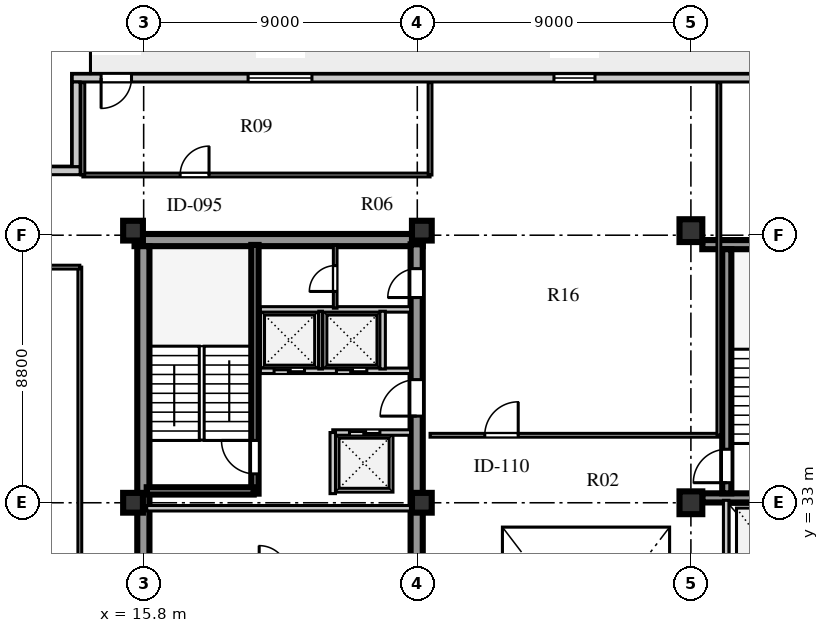
"""IFC4 building model, lengths in metres.
Left out: names, types, materials, properties, quantities, classifications, styles, units other than length and angle.
Written with IfcOpenShell. Run it as: python <this file> out.ifc"""

import sys

from ifc_helpers import new_model, si_unit, direction, frame, frame_2d, origin, origin_2d, place, context, subcontext, project, spatial, rectangle, extrude, element, fill, save


model = new_model("IFC4")
c1 = context("Model", 3, precision=1e-05, world=origin(), true_north=direction((0.0, 1.0)))
c2 = subcontext(c1, "Body", "Model", "MODEL_VIEW")
j1 = project(units=[si_unit("LENGTHUNIT", "METRE"), si_unit("PLANEANGLEUNIT", "RADIAN")], contexts=[c1])
p1 = place(None, origin())
s1 = spatial("IfcSite", under=j1, at=p1, CompositionType="ELEMENT")
p2 = place(p1, origin())
s2 = spatial("IfcBuilding", under=s1, at=p2, CompositionType="ELEMENT")
p3 = place(p2, frame((0.0, 0.0, 272.6)))
s3 = spatial("IfcBuildingStorey", under=s2, at=p3, CompositionType="ELEMENT", Elevation=272.6)
p4 = place(p3, frame((15.5, 41.64, 0.0), z_axis=(0.0, 0.0, 1.0), x_axis=(1.0, 0.0, 0.0)))
e1 = element("IfcWall", 1, at=p4, inside=s3, PredefinedType="SHEAR", context=c2, shape_type="SweptSolid", body=[
    extrude(rectangle(XDim=9.48, YDim=0.4, at=frame_2d((4.74, 0.0))), origin(), (0.0, 0.0, 1.0), 3.66),
])
p5 = place(p3, frame((15.79, 15.81, 0.0), z_axis=(0.0, 0.0, 1.0), x_axis=(0.0, 1.0, 0.0)))
e2 = element("IfcWall", 2, at=p5, inside=s3, PredefinedType="SHEAR", context=c2, shape_type="SweptSolid", body=[
    extrude(rectangle(XDim=25.63, YDim=0.4, at=frame_2d((12.815, 0.0))), origin(), (0.0, 0.0, 1.0), 3.66),
])
p6 = place(p3, frame((24.78, 15.74, 0.0), z_axis=(0.0, 0.0, 1.0), x_axis=(0.0, 1.0, 0.0)))
e3 = element("IfcWall", 3, at=p6, inside=s3, PredefinedType="SHEAR", context=c2, shape_type="SweptSolid", body=[
    extrude(rectangle(XDim=25.76, YDim=0.4, at=frame_2d((12.88, 0.0))), origin(), (0.0, 0.0, 1.0), 3.66),
])
p7 = place(p6, frame((1.61, 0.0, 0.0)))
e4 = element("IfcOpeningElement", 4, at=p7, cuts=e3, PredefinedType="OPENING", context=c2, shape_type="SweptSolid", body=[
    extrude(rectangle(XDim=1.2, YDim=2.1, at=frame_2d((0.6, 1.05))), frame((0.0, 0.21, 0.0), z_axis=(0.0, -1.0, 0.0), x_axis=(1.0, 0.0, 0.0)), (0.0, 0.0, 1.0), 0.42),
])
p8 = place(p6, frame((6.78, 0.0, 0.0)))
e5 = element("IfcOpeningElement", 5, at=p8, cuts=e3, PredefinedType="OPENING", context=c2, shape_type="SweptSolid", body=[
    extrude(rectangle(XDim=0.85, YDim=2.06, at=frame_2d((0.425, 1.03))), frame((0.0, 0.21, 0.0), z_axis=(0.0, -1.0, 0.0), x_axis=(1.0, 0.0, 0.0)), (0.0, 0.0, 1.0), 0.42),
])
p9 = place(p6, frame((12.11, 0.0, 0.0)))
e6 = element("IfcOpeningElement", 6, at=p9, cuts=e3, PredefinedType="OPENING", context=c2, shape_type="SweptSolid", body=[
    extrude(rectangle(XDim=1.5, YDim=2.12, at=frame_2d((0.75, 1.06))), frame((0.0, 0.21, 0.0), z_axis=(0.0, -1.0, 0.0), x_axis=(1.0, 0.0, 0.0)), (0.0, 0.0, 1.0), 0.42),
])
p10 = place(p6, frame((20.11, 0.0, 0.0)))
e7 = element("IfcOpeningElement", 7, at=p10, cuts=e3, PredefinedType="OPENING", context=c2, shape_type="SweptSolid", body=[
    extrude(rectangle(XDim=1.2, YDim=2.12, at=frame_2d((0.6, 1.06))), frame((0.0, 0.21, 0.0), z_axis=(0.0, -1.0, 0.0), x_axis=(1.0, 0.0, 0.0)), (0.0, 0.0, 1.0), 0.42),
])
p11 = place(p6, frame((24.01, 0.0, 0.0)))
e8 = element("IfcOpeningElement", 8, at=p11, cuts=e3, PredefinedType="OPENING", context=c2, shape_type="SweptSolid", body=[
    extrude(rectangle(XDim=0.95, YDim=2.1, at=frame_2d((0.475, 1.05))), frame((0.0, 0.21, 0.0), z_axis=(0.0, -1.0, 0.0), x_axis=(1.0, 0.0, 0.0)), (0.0, 0.0, 1.0), 0.42),
])
for number, where, z_axis, x_axis in (
    (9, (34.175, 33.16, 0.0), (0.0, 0.0, 1.0), (1.0, 0.0, 0.0)),
    (10, (34.175, 41.49, 0.0), (0.0, 0.0, 1.0), (1.0, 0.0, 0.0)),
):
    element("IfcWall", number, at=place(p3, frame(where, z_axis=z_axis, x_axis=x_axis)), inside=s3, PredefinedType="SHEAR", context=c2, shape_type="SweptSolid", body=[
        extrude(rectangle(XDim=4.695, YDim=0.3, at=frame_2d((2.348, 0.0))), origin(), (0.0, 0.0, 1.0), 3.66),
    ])
p12 = place(p3, frame((34.98, 33.31, 0.0), z_axis=(0.0, 0.0, 1.0), x_axis=(0.0, 1.0, 0.0)))
e11 = element("IfcWall", 11, at=p12, inside=s3, PredefinedType="SHEAR", context=c2, shape_type="SweptSolid", body=[
    extrude(rectangle(XDim=8.03, YDim=0.3, at=frame_2d((4.015, 0.0))), origin(), (0.0, 0.0, 1.0), 3.66),
])
p13 = place(p12, frame((0.35, 0.0, 0.0)))
e12 = element("IfcOpeningElement", 12, at=p13, cuts=e11, PredefinedType="OPENING", context=c2, shape_type="SweptSolid", body=[
    extrude(rectangle(XDim=1.1, YDim=2.1, at=frame_2d((0.55, 1.05))), frame((0.0, 0.16, 0.0), z_axis=(0.0, -1.0, 0.0), x_axis=(1.0, 0.0, 0.0)), (0.0, 0.0, 1.0), 0.32),
])
for number, where, z_axis, x_axis in (
    (13, (15.45, 33.0, 0.0), (0.0, 0.0, 1.0), (1.0, 0.0, 0.0)),
    (14, (15.45, 41.95, 0.0), (0.0, 0.0, 1.0), (1.0, 0.0, 0.0)),
    (15, (24.95, 33.0, 0.0), (0.0, 0.0, 1.0), (1.0, 0.0, 0.0)),
    (16, (24.95, 41.95, 0.0), (0.0, 0.0, 1.0), (1.0, 0.0, 0.0)),
):
    element("IfcColumn", number, at=place(p3, frame(where, z_axis=z_axis, x_axis=x_axis)), inside=s3, PredefinedType="COLUMN", context=c2, shape_type="SweptSolid", body=[
        extrude(rectangle(XDim=0.65, YDim=0.65, at=origin_2d()), origin(), (0.0, 0.0, 1.0), 3.66),
    ])
for number, where, z_axis, x_axis in (
    (17, (33.8, 33.0, 0.0), (0.0, 0.0, 1.0), (1.0, 0.0, 0.0)),
    (18, (33.8, 41.95, 0.0), (0.0, 0.0, 1.0), (1.0, 0.0, 0.0)),
):
    element("IfcColumn", number, at=place(p3, frame(where, z_axis=z_axis, x_axis=x_axis)), inside=s3, PredefinedType="COLUMN", context=c2, shape_type="SweptSolid", body=[
        extrude(rectangle(XDim=0.75, YDim=0.75, at=origin_2d()), origin(), (0.0, 0.0, 1.0), 3.66),
    ])
p14 = place(p3, frame((45.15, 46.97, 0.0), z_axis=(0.0, 0.0, 1.0), x_axis=(-1.0, 0.0, 0.0)))
e19 = element("IfcWall", 19, at=p14, inside=s3, PredefinedType="SOLIDWALL", context=c2, shape_type="SweptSolid", body=[
    extrude(rectangle(XDim=31.7, YDim=0.26, at=frame_2d((15.85, 0.0))), origin(), (0.0, 0.0, 1.0), 3.66),
])
p15 = place(p14, frame((29.75, 0.0, 0.0)))
e20 = element("IfcOpeningElement", 20, at=p15, cuts=e19, PredefinedType="OPENING", context=c2, shape_type="SweptSolid", body=[
    extrude(rectangle(XDim=1.0, YDim=2.05, at=frame_2d((0.5, 1.025))), frame((0.0, 0.14, 0.0), z_axis=(0.0, -1.0, 0.0), x_axis=(1.0, 0.0, 0.0)), (0.0, 0.0, 1.0), 0.28),
])
p16 = place(p14, frame((23.815, 0.0, 0.8)))
e21 = element("IfcOpeningElement", 21, at=p16, cuts=e19, PredefinedType="OPENING", context=c2, shape_type="SweptSolid", body=[
    extrude(rectangle(XDim=2.1, YDim=1.95, at=frame_2d((1.05, 0.975))), frame((0.0, 0.14, 0.0), z_axis=(0.0, -1.0, 0.0), x_axis=(1.0, 0.0, 0.0)), (0.0, 0.0, 1.0), 0.28),
])
p17 = place(p14, frame((14.505, 0.0, 0.8)))
e22 = element("IfcOpeningElement", 22, at=p17, cuts=e19, PredefinedType="OPENING", context=c2, shape_type="SweptSolid", body=[
    extrude(rectangle(XDim=1.35, YDim=1.9, at=frame_2d((0.675, 0.95))), frame((0.0, 0.14, 0.0), z_axis=(0.0, -1.0, 0.0), x_axis=(1.0, 0.0, 0.0)), (0.0, 0.0, 1.0), 0.28),
])
p18 = place(p14, frame((4.445, 0.0, 0.8)))
e23 = element("IfcOpeningElement", 23, at=p18, cuts=e19, PredefinedType="OPENING", context=c2, shape_type="SweptSolid", body=[
    extrude(rectangle(XDim=1.65, YDim=1.95, at=frame_2d((0.825, 0.975))), frame((0.0, 0.14, 0.0), z_axis=(0.0, -1.0, 0.0), x_axis=(1.0, 0.0, 0.0)), (0.0, 0.0, 1.0), 0.28),
])
p19 = place(p3, frame((13.58, 46.84, 0.0), z_axis=(0.0, 0.0, 1.0), x_axis=(0.0, -1.0, 0.0)))
e24 = element("IfcWall", 24, at=p19, inside=s3, PredefinedType="SOLIDWALL", context=c2, shape_type="SweptSolid", body=[
    extrude(rectangle(XDim=2.79, YDim=0.26, at=frame_2d((1.395, 0.0))), origin(), (0.0, 0.0, 1.0), 3.66),
])
p20 = place(p3, frame((13.71, 43.92, 0.0), z_axis=(0.0, 0.0, 1.0), x_axis=(-1.0, 0.0, 0.0)))
e25 = element("IfcWall", 25, at=p20, inside=s3, PredefinedType="SOLIDWALL", context=c2, shape_type="SweptSolid", body=[
    extrude(rectangle(XDim=3.31, YDim=0.26, at=frame_2d((1.655, 0.0))), origin(), (0.0, 0.0, 1.0), 3.66),
])
p21 = place(p3, frame((15.9, 32.82, 0.0), z_axis=(0.0, 0.0, 1.0), x_axis=(1.0, 0.0, 0.0)))
e26 = element("IfcWall", 26, at=p21, inside=s3, PredefinedType="SOLIDWALL", context=c2, shape_type="SweptSolid", body=[
    extrude(rectangle(XDim=8.68, YDim=0.18, at=frame_2d((4.34, 0.0))), origin(), (0.0, 0.0, 1.0), 3.06),
])
p22 = place(p3, frame((19.46, 33.3, 0.0), z_axis=(0.0, 0.0, 1.0), x_axis=(0.0, 1.0, 0.0)))
e27 = element("IfcWall", 27, at=p22, inside=s3, PredefinedType="SHEAR", context=c2, shape_type="SweptSolid", body=[
    extrude(rectangle(XDim=8.18, YDim=0.24, at=frame_2d((4.09, 0.0))), origin(), (0.0, 0.0, 1.0), 3.9),
])
p23 = place(p22, frame((0.65, 0.0, 0.0)))
e28 = element("IfcOpeningElement", 28, at=p23, cuts=e27, PredefinedType="OPENING", context=c2, shape_type="SweptSolid", body=[
    extrude(rectangle(XDim=1.1, YDim=2.1, at=frame_2d((0.55, 1.05))), frame((0.0, 0.13, 0.0), z_axis=(0.0, -1.0, 0.0), x_axis=(1.0, 0.0, 0.0)), (0.0, 0.0, 1.0), 0.26),
])
p24 = place(p3, frame((15.9, 33.39, 0.0), z_axis=(0.0, 0.0, 1.0), x_axis=(1.0, 0.0, 0.0)))
e29 = element("IfcWall", 29, at=p24, inside=s3, PredefinedType="SHEAR", context=c2, shape_type="SweptSolid", body=[
    extrude(rectangle(XDim=3.52, YDim=0.24, at=frame_2d((1.76, 0.0))), origin(), (0.0, 0.0, 1.0), 3.9),
])
p25 = place(p3, frame((22.02, 35.31, 0.0), z_axis=(0.0, 0.0, 1.0), x_axis=(1.0, 0.0, 0.0)))
e30 = element("IfcWall", 30, at=p25, inside=s3, PredefinedType="SOLIDWALL", context=c2, shape_type="SweptSolid", body=[
    extrude(rectangle(XDim=2.56, YDim=0.18, at=frame_2d((1.28, 0.0))), origin(), (0.0, 0.0, 1.0), 3.66),
])
p26 = place(p25, frame((0.55, 0.0, 0.0)))
e31 = element("IfcOpeningElement", 31, at=p26, cuts=e30, PredefinedType="OPENING", context=c2, shape_type="SweptSolid", body=[
    extrude(rectangle(XDim=1.0, YDim=2.1, at=frame_2d((0.5, 1.05))), frame((0.0, 0.1, 0.0), z_axis=(0.0, -1.0, 0.0), x_axis=(1.0, 0.0, 0.0)), (0.0, 0.0, 1.0), 0.2),
])
p27 = place(p3, frame((22.02, 33.3, 0.0), z_axis=(0.0, 0.0, 1.0), x_axis=(0.0, 1.0, 0.0)))
e32 = element("IfcWall", 32, at=p27, inside=s3, PredefinedType="SOLIDWALL", context=c2, shape_type="SweptSolid", body=[
    extrude(rectangle(XDim=2.01, YDim=0.18, at=frame_2d((1.005, 0.0))), origin(), (0.0, 0.0, 1.0), 3.66),
])
p28 = place(p3, frame((19.64, 37.34, 0.0), z_axis=(0.0, 0.0, 1.0), x_axis=(1.0, 0.0, 0.0)))
e33 = element("IfcWall", 33, at=p28, inside=s3, PredefinedType="SOLIDWALL", context=c2, shape_type="SweptSolid", body=[
    extrude(rectangle(XDim=4.94, YDim=0.18, at=frame_2d((2.47, 0.0))), origin(), (0.0, 0.0, 1.0), 3.66),
])
p29 = place(p28, frame((0.45, 0.0, 0.0)))
e34 = element("IfcOpeningElement", 34, at=p29, cuts=e33, PredefinedType="OPENING", context=c2, shape_type="SweptSolid", body=[
    extrude(rectangle(XDim=1.0, YDim=2.1, at=frame_2d((0.5, 1.05))), frame((0.0, 0.1, 0.0), z_axis=(0.0, -1.0, 0.0), x_axis=(1.0, 0.0, 0.0)), (0.0, 0.0, 1.0), 0.2),
])
p30 = place(p28, frame((2.5, 0.0, 0.0)))
e35 = element("IfcOpeningElement", 35, at=p30, cuts=e33, PredefinedType="OPENING", context=c2, shape_type="SweptSolid", body=[
    extrude(rectangle(XDim=1.0, YDim=2.1, at=frame_2d((0.5, 1.05))), frame((0.0, 0.1, 0.0), z_axis=(0.0, -1.0, 0.0), x_axis=(1.0, 0.0, 0.0)), (0.0, 0.0, 1.0), 0.2),
])
p31 = place(p3, frame((19.64, 39.36, 0.0), z_axis=(0.0, 0.0, 1.0), x_axis=(1.0, 0.0, 0.0)))
e36 = element("IfcWall", 36, at=p31, inside=s3, PredefinedType="SOLIDWALL", context=c2, shape_type="SweptSolid", body=[
    extrude(rectangle(XDim=4.94, YDim=0.18, at=frame_2d((2.47, 0.0))), origin(), (0.0, 0.0, 1.0), 3.66),
])
p32 = place(p3, frame((21.62, 37.4, 0.0), z_axis=(0.0, 0.0, 1.0), x_axis=(0.0, 1.0, 0.0)))
e37 = element("IfcWall", 37, at=p32, inside=s3, PredefinedType="PARTITIONING", context=c2, shape_type="SweptSolid", body=[
    extrude(rectangle(XDim=1.9, YDim=0.12, at=frame_2d((0.95, 0.0))), origin(), (0.0, 0.0, 1.0), 3.66),
])
p33 = place(p3, frame((23.66, 37.4, 0.0), z_axis=(0.0, 0.0, 1.0), x_axis=(0.0, 1.0, 0.0)))
e38 = element("IfcWall", 38, at=p33, inside=s3, PredefinedType="SOLIDWALL", context=c2, shape_type="SweptSolid", body=[
    extrude(rectangle(XDim=1.9, YDim=0.18, at=frame_2d((0.95, 0.0))), origin(), (0.0, 0.0, 1.0), 3.66),
])
p34 = place(p3, frame((22.1, 39.4, 0.0), z_axis=(0.0, 0.0, 1.0), x_axis=(0.0, 1.0, 0.0)))
e39 = element("IfcWall", 39, at=p34, inside=s3, PredefinedType="PARTITIONING", context=c2, shape_type="SweptSolid", body=[
    extrude(rectangle(XDim=2.08, YDim=0.12, at=frame_2d((1.04, 0.0))), origin(), (0.0, 0.0, 1.0), 3.66),
])
p35 = place(p34, frame((0.55, 0.0, 0.0)))
e40 = element("IfcOpeningElement", 40, at=p35, cuts=e39, PredefinedType="OPENING", context=c2, shape_type="SweptSolid", body=[
    extrude(rectangle(XDim=0.85, YDim=2.06, at=frame_2d((0.425, 1.03))), frame((0.0, 0.07, 0.0), z_axis=(0.0, -1.0, 0.0), x_axis=(1.0, 0.0, 0.0)), (0.0, 0.0, 1.0), 0.14),
])
p36 = place(p3, frame((34.96, 28.86, 0.0), z_axis=(0.0, 0.0, 1.0), x_axis=(0.0, 1.0, 0.0)))
e41 = element("IfcWall", 41, at=p36, inside=s3, PredefinedType="SOLIDWALL", context=c2, shape_type="SweptSolid", body=[
    extrude(rectangle(XDim=4.22, YDim=0.18, at=frame_2d((2.11, 0.0))), origin(), (0.0, 0.0, 1.0), 3.66),
])
p37 = place(p3, frame((25.22, 35.22, 0.0), z_axis=(0.0, 0.0, 1.0), x_axis=(1.0, 0.0, 0.0)))
e42 = element("IfcWall", 42, at=p37, inside=s3, PredefinedType="PLUMBINGWALL", context=c2, shape_type="SweptSolid", body=[
    extrude(rectangle(XDim=9.5, YDim=0.125, at=frame_2d((4.75, 0.0))), origin(), (0.0, 0.0, 1.0), 3.66),
])
p38 = place(p37, frame((1.8, 0.0, 0.0)))
e43 = element("IfcOpeningElement", 43, at=p38, cuts=e42, PredefinedType="OPENING", context=c2, shape_type="SweptSolid", body=[
    extrude(rectangle(XDim=1.1, YDim=2.08, at=frame_2d((0.55, 1.04))), frame((0.0, 0.073, 0.0), z_axis=(0.0, -1.0, 0.0), x_axis=(1.0, 0.0, 0.0)), (0.0, 0.0, 1.0), 0.145),
])
p39 = place(p3, frame((13.8, 43.78, 0.0), z_axis=(0.0, 0.0, 1.0), x_axis=(1.0, 0.0, 0.0)))
e44 = element("IfcWall", 44, at=p39, inside=s3, PredefinedType="PLUMBINGWALL", context=c2, shape_type="SweptSolid", body=[
    extrude(rectangle(XDim=11.42, YDim=0.125, at=frame_2d((5.71, 0.0))), origin(), (0.0, 0.0, 1.0), 3.66),
])
p40 = place(p39, frame((3.2, 0.0, 0.0)))
e45 = element("IfcOpeningElement", 45, at=p40, cuts=e44, PredefinedType="OPENING", context=c2, shape_type="SweptSolid", body=[
    extrude(rectangle(XDim=0.95, YDim=2.08, at=frame_2d((0.475, 1.04))), frame((0.0, 0.073, 0.0), z_axis=(0.0, -1.0, 0.0), x_axis=(1.0, 0.0, 0.0)), (0.0, 0.0, 1.0), 0.145),
])
p41 = place(p3, frame((13.8, 43.78, 0.0), z_axis=(0.0, 0.0, 1.0), x_axis=(0.0, 1.0, 0.0)))
e46 = element("IfcWall", 46, at=p41, inside=s3, PredefinedType="PLUMBINGWALL", context=c2, shape_type="SweptSolid", body=[
    extrude(rectangle(XDim=3.04, YDim=0.125, at=frame_2d((1.52, 0.0))), origin(), (0.0, 0.0, 1.0), 3.66),
])
p42 = place(p3, frame((25.22, 43.78, 0.0), z_axis=(0.0, 0.0, 1.0), x_axis=(0.0, 1.0, 0.0)))
e47 = element("IfcWall", 47, at=p42, inside=s3, PredefinedType="PLUMBINGWALL", context=c2, shape_type="SweptSolid", body=[
    extrude(rectangle(XDim=3.04, YDim=0.125, at=frame_2d((1.52, 0.0))), origin(), (0.0, 0.0, 1.0), 3.21),
])
p43 = place(p3, frame((13.7, 16.45, 0.0), z_axis=(0.0, 0.0, 1.0), x_axis=(0.0, 1.0, 0.0)))
e48 = element("IfcWall", 48, at=p43, inside=s3, PredefinedType="PLUMBINGWALL", context=c2, shape_type="SweptSolid", body=[
    extrude(rectangle(XDim=24.3, YDim=0.125, at=frame_2d((12.15, 0.0))), origin(), (0.0, 0.0, 1.0), 3.66),
])
p44 = place(p43, frame((5.1, 0.0, 0.0)))
e49 = element("IfcOpeningElement", 49, at=p44, cuts=e48, PredefinedType="OPENING", context=c2, shape_type="SweptSolid", body=[
    extrude(rectangle(XDim=0.95, YDim=2.08, at=frame_2d((0.475, 1.04))), frame((0.0, 0.073, 0.0), z_axis=(0.0, -1.0, 0.0), x_axis=(1.0, 0.0, 0.0)), (0.0, 0.0, 1.0), 0.145),
])
p45 = place(p3, frame((10.68, 40.75, 0.0), z_axis=(0.0, 0.0, 1.0), x_axis=(1.0, 0.0, 0.0)))
e50 = element("IfcWall", 50, at=p45, inside=s3, PredefinedType="PLUMBINGWALL", context=c2, shape_type="SweptSolid", body=[
    extrude(rectangle(XDim=3.02, YDim=0.125, at=frame_2d((1.51, 0.0))), origin(), (0.0, 0.0, 1.0), 3.66),
])
p46 = place(p3, frame((34.72, 35.22, 0.0), z_axis=(0.0, 0.0, 1.0), x_axis=(0.0, 1.0, 0.0)))
e51 = element("IfcWall", 51, at=p46, inside=s3, PredefinedType="PLUMBINGWALL", context=c2, shape_type="SweptSolid", body=[
    extrude(rectangle(XDim=11.6, YDim=0.125, at=frame_2d((5.8, 0.0))), origin(), (0.0, 0.0, 1.0), 3.66),
])
p47 = place(p15, frame((1.0, 0.0, 0.0), z_axis=(0.0, 0.0, 1.0), x_axis=(-1.0, 0.0, 0.0)))
e52 = element("IfcDoor", 52, at=p47, inside=s3, OperationType="SINGLE_SWING_LEFT", PredefinedType="DOOR", context=c2, shape_type="SweptSolid", body=[
    extrude(rectangle(XDim=1.0, YDim=2.05, at=frame_2d((0.5, 1.025))), frame((0.0, 0.025, 0.0), z_axis=(0.0, -1.0, 0.0), x_axis=(1.0, 0.0, 0.0)), (0.0, 0.0, 1.0), 0.05),
])
fill(e20, e52)
p48 = place(p16, origin())
e53 = element("IfcWindow", 53, at=p48, inside=s3, PartitioningType="SINGLE_PANEL", PredefinedType="WINDOW", context=c2, shape_type="SweptSolid", body=[
    extrude(rectangle(XDim=2.1, YDim=1.95, at=frame_2d((1.05, 0.975))), frame((0.0, 0.03, 0.0), z_axis=(0.0, -1.0, 0.0), x_axis=(1.0, 0.0, 0.0)), (0.0, 0.0, 1.0), 0.06),
])
fill(e21, e53)
p49 = place(p17, origin())
e54 = element("IfcWindow", 54, at=p49, inside=s3, PartitioningType="SINGLE_PANEL", PredefinedType="WINDOW", context=c2, shape_type="SweptSolid", body=[
    extrude(rectangle(XDim=1.35, YDim=1.9, at=frame_2d((0.675, 0.95))), frame((0.0, 0.03, 0.0), z_axis=(0.0, -1.0, 0.0), x_axis=(1.0, 0.0, 0.0)), (0.0, 0.0, 1.0), 0.06),
])
fill(e22, e54)
p50 = place(p23, origin())
e55 = element("IfcDoor", 55, at=p50, inside=s3, OperationType="SINGLE_SWING_RIGHT", PredefinedType="DOOR", context=c2, shape_type="SweptSolid", body=[
    extrude(rectangle(XDim=1.1, YDim=2.1, at=frame_2d((0.55, 1.05))), frame((0.0, 0.025, 0.0), z_axis=(0.0, -1.0, 0.0), x_axis=(1.0, 0.0, 0.0)), (0.0, 0.0, 1.0), 0.05),
])
fill(e28, e55)
p51 = place(p10, frame((1.2, 0.0, 0.0), z_axis=(0.0, 0.0, 1.0), x_axis=(-1.0, 0.0, 0.0)))
e56 = element("IfcDoor", 56, at=p51, inside=s3, OperationType="SINGLE_SWING_RIGHT", PredefinedType="DOOR", context=c2, shape_type="SweptSolid", body=[
    extrude(rectangle(XDim=1.2, YDim=2.12, at=frame_2d((0.6, 1.06))), frame((0.0, 0.025, 0.0), z_axis=(0.0, -1.0, 0.0), x_axis=(1.0, 0.0, 0.0)), (0.0, 0.0, 1.0), 0.05),
])
fill(e7, e56)
p52 = place(p29, frame((1.0, 0.0, 0.0), z_axis=(0.0, 0.0, 1.0), x_axis=(-1.0, 0.0, 0.0)))
e57 = element("IfcDoor", 57, at=p52, inside=s3, OperationType="DOUBLE_DOOR_SLIDING", PredefinedType="DOOR", context=c2, shape_type="SweptSolid", body=[
    extrude(rectangle(XDim=1.0, YDim=2.1, at=frame_2d((0.5, 1.05))), frame((0.0, 0.025, 0.0), z_axis=(0.0, -1.0, 0.0), x_axis=(1.0, 0.0, 0.0)), (0.0, 0.0, 1.0), 0.05),
])
fill(e34, e57)
p53 = place(p30, frame((1.0, 0.0, 0.0), z_axis=(0.0, 0.0, 1.0), x_axis=(-1.0, 0.0, 0.0)))
e58 = element("IfcDoor", 58, at=p53, inside=s3, OperationType="DOUBLE_DOOR_SLIDING", PredefinedType="DOOR", context=c2, shape_type="SweptSolid", body=[
    extrude(rectangle(XDim=1.0, YDim=2.1, at=frame_2d((0.5, 1.05))), frame((0.0, 0.025, 0.0), z_axis=(0.0, -1.0, 0.0), x_axis=(1.0, 0.0, 0.0)), (0.0, 0.0, 1.0), 0.05),
])
fill(e35, e58)
p54 = place(p26, origin())
e59 = element("IfcDoor", 59, at=p54, inside=s3, OperationType="DOUBLE_DOOR_SLIDING", PredefinedType="DOOR", context=c2, shape_type="SweptSolid", body=[
    extrude(rectangle(XDim=1.0, YDim=2.1, at=frame_2d((0.5, 1.05))), frame((0.0, 0.025, 0.0), z_axis=(0.0, -1.0, 0.0), x_axis=(1.0, 0.0, 0.0)), (0.0, 0.0, 1.0), 0.05),
])
fill(e31, e59)
p55 = place(p35, origin())
e60 = element("IfcDoor", 60, at=p55, inside=s3, OperationType="SINGLE_SWING_LEFT", PredefinedType="DOOR", context=c2, shape_type="SweptSolid", body=[
    extrude(rectangle(XDim=0.85, YDim=2.06, at=frame_2d((0.425, 1.03))), frame((0.0, 0.025, 0.0), z_axis=(0.0, -1.0, 0.0), x_axis=(1.0, 0.0, 0.0)), (0.0, 0.0, 1.0), 0.05),
])
fill(e40, e60)
p56 = place(p11, frame((0.95, 0.0, 0.0), z_axis=(0.0, 0.0, 1.0), x_axis=(-1.0, 0.0, 0.0)))
e61 = element("IfcDoor", 61, at=p56, inside=s3, OperationType="SINGLE_SWING_RIGHT", PredefinedType="DOOR", context=c2, shape_type="SweptSolid", body=[
    extrude(rectangle(XDim=0.95, YDim=2.1, at=frame_2d((0.475, 1.05))), frame((0.0, 0.025, 0.0), z_axis=(0.0, -1.0, 0.0), x_axis=(1.0, 0.0, 0.0)), (0.0, 0.0, 1.0), 0.05),
])
fill(e8, e61)
p57 = place(p13, origin())
e62 = element("IfcDoor", 62, at=p57, inside=s3, OperationType="SINGLE_SWING_LEFT", PredefinedType="DOOR", context=c2, shape_type="SweptSolid", body=[
    extrude(rectangle(XDim=1.1, YDim=2.1, at=frame_2d((0.55, 1.05))), frame((0.0, 0.025, 0.0), z_axis=(0.0, -1.0, 0.0), x_axis=(1.0, 0.0, 0.0)), (0.0, 0.0, 1.0), 0.05),
])
fill(e12, e62)
p58 = place(p40, origin())
e63 = element("IfcDoor", 63, at=p58, inside=s3, OperationType="SINGLE_SWING_RIGHT", PredefinedType="DOOR", context=c2, shape_type="SweptSolid", body=[
    extrude(rectangle(XDim=0.95, YDim=2.08, at=frame_2d((0.475, 1.04))), frame((0.0, 0.025, 0.0), z_axis=(0.0, -1.0, 0.0), x_axis=(1.0, 0.0, 0.0)), (0.0, 0.0, 1.0), 0.05),
])
fill(e45, e63)
p59 = place(p38, origin())
e64 = element("IfcDoor", 64, at=p59, inside=s3, OperationType="SINGLE_SWING_RIGHT", PredefinedType="DOOR", context=c2, shape_type="SweptSolid", body=[
    extrude(rectangle(XDim=1.1, YDim=2.08, at=frame_2d((0.55, 1.04))), frame((0.0, 0.025, 0.0), z_axis=(0.0, -1.0, 0.0), x_axis=(1.0, 0.0, 0.0)), (0.0, 0.0, 1.0), 0.05),
])
fill(e43, e64)
save(model, sys.argv[1])
